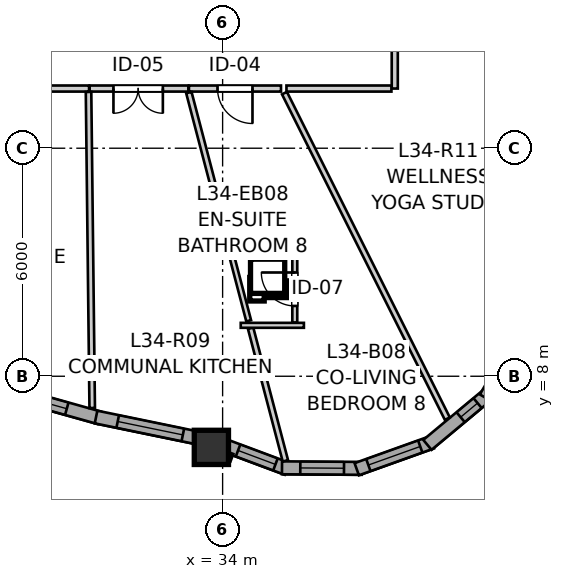
"""IFC4 building model, lengths in metres.
Left out: names, types, materials, properties, quantities, classifications, styles, units other than length and angle.
Written with IfcOpenShell. Run it as: python <this file> out.ifc"""

import sys

from ifc_helpers import new_model, si_unit, direction, frame, frame_2d, origin, origin_2d, place, context, subcontext, project, spatial, rectangle, extrude, source, transform, mapped, element, fill, save


model = new_model("IFC4")
c1 = context("Model", 3, precision=1e-05, world=origin(), true_north=direction((0.0, 1.0)))
c2 = subcontext(c1, "Body", "Model", "MODEL_VIEW")
j1 = project(units=[si_unit("LENGTHUNIT", "METRE"), si_unit("PLANEANGLEUNIT", "RADIAN")], contexts=[c1])
p1 = place(None, origin())
s1 = spatial("IfcSite", under=j1, at=p1, CompositionType="ELEMENT")
p2 = place(p1, origin())
s2 = spatial("IfcBuilding", under=s1, at=p2, CompositionType="ELEMENT")
p3 = place(p2, frame((0.0, 0.0, 115.2)))
s3 = spatial("IfcBuildingStorey", under=s2, at=p3, CompositionType="ELEMENT", Elevation=115.2)
m1 = source(origin(), c2, "Body", "SweptSolid", [
    extrude(rectangle(XDim=0.9, YDim=0.9, at=origin_2d()), origin(), (0.0, 0.0, 1.0), 2.95),
])
p4 = place(p3, frame((33.704, 6.128, 0.0), z_axis=(0.0, 0.0, 1.0), x_axis=(1.0, 0.0, 0.0)))
e1 = element("IfcColumn", 1, at=p4, inside=s3, PredefinedType="COLUMN", context=c2, shape_type="MappedRepresentation", body=[
    mapped(m1, transform((0.0, 0.0, 0.0), x_axis=(1.0, 0.0, 0.0), y_axis=(0.0, 1.0, 0.0), z_axis=(0.0, 0.0, 1.0), scale=1.0)),
])
p5 = place(p3, frame((27.819, 7.728, 0.0), z_axis=(0.0, 0.0, 1.0), x_axis=(0.963032186905, -0.269386352632, 0.0)))
e2 = element("IfcWall", 2, at=p5, inside=s3, PredefinedType="SOLIDWALL", context=c2, shape_type="SweptSolid", body=[
    extrude(rectangle(XDim=3.049, YDim=0.34, at=frame_2d((1.524, 0.0))), origin(), (0.0, 0.0, 1.0), 2.48),
])
p6 = place(p5, frame((0.71, 0.0, 0.82)))
e3 = element("IfcOpeningElement", 3, at=p6, cuts=e2, PredefinedType="OPENING", context=c2, shape_type="SweptSolid", body=[
    extrude(rectangle(XDim=1.45, YDim=1.25, at=frame_2d((0.725, 0.625))), frame((0.0, 0.18, 0.0), z_axis=(0.0, -1.0, 0.0), x_axis=(1.0, 0.0, 0.0)), (0.0, 0.0, 1.0), 0.36),
])
p7 = place(p3, frame((30.67, 6.927, 0.0), z_axis=(0.0, 0.0, 1.0), x_axis=(0.979422345081, -0.201821381317, 0.0)))
e4 = element("IfcWall", 4, at=p7, inside=s3, PredefinedType="SOLIDWALL", context=c2, shape_type="SweptSolid", body=[
    extrude(rectangle(XDim=2.903, YDim=0.34, at=frame_2d((1.452, 0.0))), origin(), (0.0, 0.0, 1.0), 2.48),
])
p8 = place(p7, frame((0.582, 0.0, 0.82)))
e5 = element("IfcOpeningElement", 5, at=p8, cuts=e4, PredefinedType="OPENING", context=c2, shape_type="SweptSolid", body=[
    extrude(rectangle(XDim=1.75, YDim=1.3, at=frame_2d((0.875, 0.65))), frame((0.0, 0.18, 0.0), z_axis=(0.0, -1.0, 0.0), x_axis=(1.0, 0.0, 0.0)), (0.0, 0.0, 1.0), 0.36),
])
p9 = place(p3, frame((33.979, 6.207, 0.0), z_axis=(0.0, 0.0, 1.0), x_axis=(0.936799566991, -0.349866504951, 0.0)))
e6 = element("IfcWall", 6, at=p9, inside=s3, PredefinedType="SOLIDWALL", context=c2, shape_type="SweptSolid", body=[
    extrude(rectangle(XDim=1.831, YDim=0.34, at=frame_2d((0.916, 0.0))), origin(), (0.0, 0.0, 1.0), 2.48),
])
p10 = place(p9, frame((0.456, 0.0, 0.82)))
e7 = element("IfcOpeningElement", 7, at=p10, cuts=e6, PredefinedType="OPENING", context=c2, shape_type="SweptSolid", body=[
    extrude(rectangle(XDim=1.05, YDim=1.45, at=frame_2d((0.525, 0.725))), frame((0.0, 0.18, 0.0), z_axis=(0.0, -1.0, 0.0), x_axis=(1.0, 0.0, 0.0)), (0.0, 0.0, 1.0), 0.36),
])
p11 = place(p3, frame((35.562, 5.591, 0.0), z_axis=(0.0, 0.0, 1.0), x_axis=(0.999976456891, -0.00686189939, 0.0)))
e8 = element("IfcWall", 8, at=p11, inside=s3, PredefinedType="SOLIDWALL", context=c2, shape_type="SweptSolid", body=[
    extrude(rectangle(XDim=2.099, YDim=0.34, at=frame_2d((1.05, 0.0))), origin(), (0.0, 0.0, 1.0), 2.48),
])
p12 = place(p11, frame((0.482, 0.0, 0.82)))
e9 = element("IfcOpeningElement", 9, at=p12, cuts=e8, PredefinedType="OPENING", context=c2, shape_type="SweptSolid", body=[
    extrude(rectangle(XDim=1.15, YDim=1.2, at=frame_2d((0.575, 0.6))), frame((0.0, 0.18, 0.0), z_axis=(0.0, -1.0, 0.0), x_axis=(1.0, 0.0, 0.0)), (0.0, 0.0, 1.0), 0.36),
])
p13 = place(p3, frame((37.529, 5.554, 0.0), z_axis=(0.0, 0.0, 1.0), x_axis=(0.941486401639, 0.33705096874, 0.0)))
e10 = element("IfcWall", 10, at=p13, inside=s3, PredefinedType="SOLIDWALL", context=c2, shape_type="SweptSolid", body=[
    extrude(rectangle(XDim=2.099, YDim=0.34, at=frame_2d((1.05, 0.0))), origin(), (0.0, 0.0, 1.0), 2.48),
])
p14 = place(p13, frame((0.324, 0.0, 0.82)))
e11 = element("IfcOpeningElement", 11, at=p14, cuts=e10, PredefinedType="OPENING", context=c2, shape_type="SweptSolid", body=[
    extrude(rectangle(XDim=1.45, YDim=1.25, at=frame_2d((0.725, 0.625))), frame((0.0, 0.18, 0.0), z_axis=(0.0, -1.0, 0.0), x_axis=(1.0, 0.0, 0.0)), (0.0, 0.0, 1.0), 0.36),
])
p15 = place(p3, frame((39.389, 6.195, 0.0), z_axis=(0.0, 0.0, 1.0), x_axis=(0.768488123124, 0.639864051669, 0.0)))
e12 = element("IfcWall", 12, at=p15, inside=s3, PredefinedType="SOLIDWALL", context=c2, shape_type="SweptSolid", body=[
    extrude(rectangle(XDim=2.099, YDim=0.34, at=frame_2d((1.05, 0.0))), origin(), (0.0, 0.0, 1.0), 2.48),
])
p16 = place(p15, frame((1.138, 0.0, 0.82)))
e13 = element("IfcOpeningElement", 13, at=p16, cuts=e12, PredefinedType="OPENING", context=c2, shape_type="SweptSolid", body=[
    extrude(rectangle(XDim=0.58, YDim=1.35, at=frame_2d((0.29, 0.675))), frame((0.0, 0.18, 0.0), z_axis=(0.0, -1.0, 0.0), x_axis=(1.0, 0.0, 0.0)), (0.0, 0.0, 1.0), 0.36),
])
p17 = place(p3, frame((40.916, 7.435, 0.0), z_axis=(0.0, 0.0, 1.0), x_axis=(0.501989603552, 0.864873654313, 0.0)))
e14 = element("IfcWall", 14, at=p17, inside=s3, PredefinedType="SOLIDWALL", context=c2, shape_type="SweptSolid", body=[
    extrude(rectangle(XDim=2.099, YDim=0.34, at=frame_2d((1.05, 0.0))), origin(), (0.0, 0.0, 1.0), 2.48),
])
p18 = place(p17, frame((0.3, 0.0, 0.82)))
e15 = element("IfcOpeningElement", 15, at=p18, cuts=e14, PredefinedType="OPENING", context=c2, shape_type="SweptSolid", body=[
    extrude(rectangle(XDim=1.5, YDim=1.45, at=frame_2d((0.75, 0.725))), frame((0.0, 0.18, 0.0), z_axis=(0.0, -1.0, 0.0), x_axis=(1.0, 0.0, 0.0)), (0.0, 0.0, 1.0), 0.36),
])
p19 = place(p3, frame((30.486, 15.57, 0.0), z_axis=(0.0, 0.0, 1.0), x_axis=(-1.0, 0.0, 0.0)))
e16 = element("IfcWall", 16, at=p19, inside=s3, PredefinedType="PARTITIONING", context=c2, shape_type="SweptSolid", body=[
    extrude(rectangle(XDim=6.725, YDim=0.16, at=frame_2d((3.363, 0.0))), origin(), (0.0, 0.0, 1.0), 2.95),
])
p20 = place(p19, frame((2.711, 0.0, 0.0)))
e17 = element("IfcOpeningElement", 17, at=p20, cuts=e16, PredefinedType="OPENING", context=c2, shape_type="SweptSolid", body=[
    extrude(rectangle(XDim=1.3, YDim=2.1, at=frame_2d((0.65, 1.05))), frame((0.0, 0.09, 0.0), z_axis=(0.0, -1.0, 0.0), x_axis=(1.0, 0.0, 0.0)), (0.0, 0.0, 1.0), 0.18),
])
p21 = place(p3, frame((38.53, 21.863, 0.0), z_axis=(0.0, 0.0, 1.0), x_axis=(0.0, -1.0, 0.0)))
e18 = element("IfcWall", 18, at=p21, inside=s3, PredefinedType="PARTITIONING", context=c2, shape_type="SweptSolid", body=[
    extrude(rectangle(XDim=6.293, YDim=0.16, at=frame_2d((3.146, 0.0))), origin(), (0.0, 0.0, 1.0), 2.95),
])
p22 = place(p21, frame((2.675, 0.0, 0.0)))
e19 = element("IfcOpeningElement", 19, at=p22, cuts=e18, PredefinedType="OPENING", context=c2, shape_type="SweptSolid", body=[
    extrude(rectangle(XDim=0.96, YDim=2.1, at=frame_2d((0.48, 1.05))), frame((0.0, 0.09, 0.0), z_axis=(0.0, -1.0, 0.0), x_axis=(1.0, 0.0, 0.0)), (0.0, 0.0, 1.0), 0.18),
])
p23 = place(p3, frame((33.099, 15.57, 0.0), z_axis=(0.0, 0.0, 1.0), x_axis=(-1.0, 0.0, 0.0)))
e20 = element("IfcWall", 20, at=p23, inside=s3, PredefinedType="PARTITIONING", context=c2, shape_type="SweptSolid", body=[
    extrude(rectangle(XDim=2.598, YDim=0.16, at=frame_2d((1.299, 0.0))), origin(), (0.0, 0.0, 1.0), 2.95),
])
p24 = place(p23, frame((0.671, 0.0, 0.0)))
e21 = element("IfcOpeningElement", 21, at=p24, cuts=e20, PredefinedType="OPENING", context=c2, shape_type="SweptSolid", body=[
    extrude(rectangle(XDim=1.3, YDim=2.1, at=frame_2d((0.65, 1.05))), frame((0.0, 0.09, 0.0), z_axis=(0.0, -1.0, 0.0), x_axis=(1.0, 0.0, 0.0)), (0.0, 0.0, 1.0), 0.18),
])
p25 = place(p3, frame((35.536, 15.57, 0.0), z_axis=(0.0, 0.0, 1.0), x_axis=(-1.0, 0.0, 0.0)))
e22 = element("IfcWall", 22, at=p25, inside=s3, PredefinedType="PARTITIONING", context=c2, shape_type="SweptSolid", body=[
    extrude(rectangle(XDim=2.422, YDim=0.16, at=frame_2d((1.211, 0.0))), origin(), (0.0, 0.0, 1.0), 2.95),
])
p26 = place(p25, frame((0.75, 0.0, 0.0)))
e23 = element("IfcOpeningElement", 23, at=p26, cuts=e22, PredefinedType="OPENING", context=c2, shape_type="SweptSolid", body=[
    extrude(rectangle(XDim=0.92, YDim=2.1, at=frame_2d((0.46, 1.05))), frame((0.0, 0.09, 0.0), z_axis=(0.0, -1.0, 0.0), x_axis=(1.0, 0.0, 0.0)), (0.0, 0.0, 1.0), 0.18),
])
p27 = place(p3, frame((35.899, 9.413, 0.0), z_axis=(0.0, 0.0, 1.0), x_axis=(0.0, 1.0, 0.0)))
e24 = element("IfcWall", 24, at=p27, inside=s3, PredefinedType="PARTITIONING", context=c2, shape_type="SweptSolid", body=[
    extrude(rectangle(XDim=1.827, YDim=0.13, at=frame_2d((0.914, 0.0))), origin(), (0.0, 0.0, 1.0), 2.95),
])
p28 = place(p27, frame((0.437, 0.0, 0.0)))
e25 = element("IfcOpeningElement", 25, at=p28, cuts=e24, PredefinedType="OPENING", context=c2, shape_type="SweptSolid", body=[
    extrude(rectangle(XDim=0.88, YDim=2.05, at=frame_2d((0.44, 1.025))), frame((0.0, 0.075, 0.0), z_axis=(0.0, -1.0, 0.0), x_axis=(1.0, 0.0, 0.0)), (0.0, 0.0, 1.0), 0.15),
])
p29 = place(p3, frame((35.628, 15.45, 0.0), z_axis=(0.0, 0.0, 1.0), x_axis=(0.447427687311, -0.894320113062, 0.0)))
e26 = element("IfcWall", 26, at=p29, inside=s3, PredefinedType="PARTITIONING", context=c2, shape_type="SweptSolid", body=[
    extrude(rectangle(XDim=9.578, YDim=0.145, at=frame_2d((4.789, 0.0))), origin(), (0.0, 0.0, 1.0), 2.95),
])
p30 = place(p3, frame((30.472, 15.481, 0.0), z_axis=(0.0, 0.0, 1.0), x_axis=(0.011623708307, -0.999932442421, 0.0)))
e27 = element("IfcWall", 27, at=p30, inside=s3, PredefinedType="PARTITIONING", context=c2, shape_type="SweptSolid", body=[
    extrude(rectangle(XDim=8.317, YDim=0.145, at=frame_2d((4.159, 0.0))), origin(), (0.0, 0.0, 1.0), 2.95),
])
p31 = place(p3, frame((33.112, 15.464, 0.0), z_axis=(0.0, 0.0, 1.0), x_axis=(0.253558008984, -0.967320182814, 0.0)))
e28 = element("IfcWall", 28, at=p31, inside=s3, PredefinedType="PARTITIONING", context=c2, shape_type="SweptSolid", body=[
    extrude(rectangle(XDim=4.382, YDim=0.145, at=frame_2d((2.191, 0.0))), origin(), (0.0, 0.0, 1.0), 2.95),
])
p32 = place(p3, frame((34.737, 9.264, 0.0), z_axis=(0.0, 0.0, 1.0), x_axis=(0.253650405993, -0.967295958608, 0.0)))
e29 = element("IfcWall", 29, at=p32, inside=s3, PredefinedType="PARTITIONING", context=c2, shape_type="SweptSolid", body=[
    extrude(rectangle(XDim=3.607, YDim=0.145, at=frame_2d((1.804, 0.0))), origin(), (0.0, 0.0, 1.0), 2.95),
])
p33 = place(p3, frame((35.68, 15.57, 0.0), z_axis=(0.0, 0.0, 1.0), x_axis=(1.0, 0.0, 0.0)))
e30 = element("IfcWall", 30, at=p33, inside=s3, PredefinedType="PARTITIONING", context=c2, shape_type="SweptSolid", body=[
    extrude(rectangle(XDim=2.762, YDim=0.16, at=frame_2d((1.381, 0.0))), origin(), (0.0, 0.0, 1.0), 2.95),
])
p34 = place(p3, frame((34.227, 11.21, 0.0), z_axis=(0.0, 0.0, 1.0), x_axis=(0.2534645297, -0.967344681168, 0.0)))
e31 = element("IfcWall", 31, at=p34, inside=s3, PredefinedType="PARTITIONING", context=c2, shape_type="SweptSolid", body=[
    extrude(rectangle(XDim=1.811, YDim=0.13, at=frame_2d((0.905, 0.0))), origin(), (0.0, 0.0, 1.0), 2.95),
])
p35 = place(p3, frame((34.319, 11.24, 0.0), z_axis=(0.0, 0.0, 1.0), x_axis=(1.0, 0.0, 0.0)))
e32 = element("IfcWall", 32, at=p35, inside=s3, PredefinedType="PARTITIONING", context=c2, shape_type="SweptSolid", body=[
    extrude(rectangle(XDim=1.507, YDim=0.13, at=frame_2d((0.753, 0.0))), origin(), (0.0, 0.0, 1.0), 2.95),
])
p36 = place(p3, frame((34.477, 9.34, 0.0), z_axis=(0.0, 0.0, 1.0), x_axis=(1.0, 0.0, 0.0)))
e33 = element("IfcWall", 33, at=p36, inside=s3, PredefinedType="PARTITIONING", context=c2, shape_type="SweptSolid", body=[
    extrude(rectangle(XDim=1.662, YDim=0.13, at=frame_2d((0.831, 0.0))), origin(), (0.0, 0.0, 1.0), 2.95),
])
m2 = source(origin(), c2, "Body", "SweptSolid", [
    extrude(rectangle(XDim=1.45, YDim=1.25, at=frame_2d((0.725, 0.625))), frame((0.0, 0.03, 0.0), z_axis=(0.0, -1.0, 0.0), x_axis=(1.0, 0.0, 0.0)), (0.0, 0.0, 1.0), 0.06),
])
p37 = place(p6, origin())
e34 = element("IfcWindow", 34, at=p37, inside=s3, PartitioningType="SINGLE_PANEL", PredefinedType="WINDOW", context=c2, shape_type="MappedRepresentation", body=[
    mapped(m2, transform((0.0, 0.0, 0.0), x_axis=(1.0, 0.0, 0.0), y_axis=(0.0, 1.0, 0.0), z_axis=(0.0, 0.0, 1.0), scale=1.0)),
])
fill(e3, e34)
m3 = source(origin(), c2, "Body", "SweptSolid", [
    extrude(rectangle(XDim=1.75, YDim=1.3, at=frame_2d((0.875, 0.65))), frame((0.0, 0.03, 0.0), z_axis=(0.0, -1.0, 0.0), x_axis=(1.0, 0.0, 0.0)), (0.0, 0.0, 1.0), 0.06),
])
p38 = place(p8, origin())
e35 = element("IfcWindow", 35, at=p38, inside=s3, PartitioningType="SINGLE_PANEL", PredefinedType="WINDOW", context=c2, shape_type="MappedRepresentation", body=[
    mapped(m3, transform((0.0, 0.0, 0.0), x_axis=(1.0, 0.0, 0.0), y_axis=(0.0, 1.0, 0.0), z_axis=(0.0, 0.0, 1.0), scale=1.0)),
])
fill(e5, e35)
m4 = source(origin(), c2, "Body", "SweptSolid", [
    extrude(rectangle(XDim=1.05, YDim=1.45, at=frame_2d((0.525, 0.725))), frame((0.0, 0.03, 0.0), z_axis=(0.0, -1.0, 0.0), x_axis=(1.0, 0.0, 0.0)), (0.0, 0.0, 1.0), 0.06),
])
p39 = place(p10, origin())
e36 = element("IfcWindow", 36, at=p39, inside=s3, PartitioningType="SINGLE_PANEL", PredefinedType="WINDOW", context=c2, shape_type="MappedRepresentation", body=[
    mapped(m4, transform((0.0, 0.0, 0.0), x_axis=(1.0, 0.0, 0.0), y_axis=(0.0, 1.0, 0.0), z_axis=(0.0, 0.0, 1.0), scale=1.0)),
])
fill(e7, e36)
m5 = source(origin(), c2, "Body", "SweptSolid", [
    extrude(rectangle(XDim=1.15, YDim=1.2, at=frame_2d((0.575, 0.6))), frame((0.0, 0.03, 0.0), z_axis=(0.0, -1.0, 0.0), x_axis=(1.0, 0.0, 0.0)), (0.0, 0.0, 1.0), 0.06),
])
p40 = place(p12, origin())
e37 = element("IfcWindow", 37, at=p40, inside=s3, PartitioningType="SINGLE_PANEL", PredefinedType="WINDOW", context=c2, shape_type="MappedRepresentation", body=[
    mapped(m5, transform((0.0, 0.0, 0.0), x_axis=(1.0, 0.0, 0.0), y_axis=(0.0, 1.0, 0.0), z_axis=(0.0, 0.0, 1.0), scale=1.0)),
])
fill(e9, e37)
p41 = place(p14, origin())
e38 = element("IfcWindow", 38, at=p41, inside=s3, PartitioningType="SINGLE_PANEL", PredefinedType="WINDOW", context=c2, shape_type="MappedRepresentation", body=[
    mapped(m2, transform((0.0, 0.0, 0.0), x_axis=(1.0, 0.0, 0.0), y_axis=(0.0, 1.0, 0.0), z_axis=(0.0, 0.0, 1.0), scale=1.0)),
])
fill(e11, e38)
m6 = source(origin(), c2, "Body", "SweptSolid", [
    extrude(rectangle(XDim=0.58, YDim=1.35, at=frame_2d((0.29, 0.675))), frame((0.0, 0.03, 0.0), z_axis=(0.0, -1.0, 0.0), x_axis=(1.0, 0.0, 0.0)), (0.0, 0.0, 1.0), 0.06),
])
p42 = place(p16, origin())
e39 = element("IfcWindow", 39, at=p42, inside=s3, PartitioningType="SINGLE_PANEL", PredefinedType="WINDOW", context=c2, shape_type="MappedRepresentation", body=[
    mapped(m6, transform((0.0, 0.0, 0.0), x_axis=(1.0, 0.0, 0.0), y_axis=(0.0, 1.0, 0.0), z_axis=(0.0, 0.0, 1.0), scale=1.0)),
])
fill(e13, e39)
m7 = source(origin(), c2, "Body", "SweptSolid", [
    extrude(rectangle(XDim=1.3, YDim=2.1, at=frame_2d((0.65, 1.05))), frame((0.0, 0.025, 0.0), z_axis=(0.0, -1.0, 0.0), x_axis=(1.0, 0.0, 0.0)), (0.0, 0.0, 1.0), 0.05),
])
p43 = place(p24, origin())
e40 = element("IfcDoor", 40, at=p43, inside=s3, OperationType="DOUBLE_DOOR_SINGLE_SWING", PredefinedType="DOOR", context=c2, shape_type="MappedRepresentation", body=[
    mapped(m7, transform((0.0, 0.0, 0.0), x_axis=(1.0, 0.0, 0.0), y_axis=(0.0, 1.0, 0.0), z_axis=(0.0, 0.0, 1.0), scale=1.0)),
])
fill(e21, e40)
m8 = source(origin(), c2, "Body", "SweptSolid", [
    extrude(rectangle(XDim=0.92, YDim=2.1, at=frame_2d((0.46, 1.05))), frame((0.0, 0.025, 0.0), z_axis=(0.0, -1.0, 0.0), x_axis=(1.0, 0.0, 0.0)), (0.0, 0.0, 1.0), 0.05),
])
p44 = place(p26, origin())
e41 = element("IfcDoor", 41, at=p44, inside=s3, OperationType="SINGLE_SWING_LEFT", PredefinedType="DOOR", context=c2, shape_type="MappedRepresentation", body=[
    mapped(m8, transform((0.0, 0.0, 0.0), x_axis=(1.0, 0.0, 0.0), y_axis=(0.0, 1.0, 0.0), z_axis=(0.0, 0.0, 1.0), scale=1.0)),
])
fill(e23, e41)
m9 = source(origin(), c2, "Body", "SweptSolid", [
    extrude(rectangle(XDim=0.88, YDim=2.05, at=frame_2d((0.44, 1.025))), frame((0.0, 0.025, 0.0), z_axis=(0.0, -1.0, 0.0), x_axis=(1.0, 0.0, 0.0)), (0.0, 0.0, 1.0), 0.05),
])
p45 = place(p28, origin())
e42 = element("IfcDoor", 42, at=p45, inside=s3, OperationType="SINGLE_SWING_RIGHT", PredefinedType="DOOR", context=c2, shape_type="MappedRepresentation", body=[
    mapped(m9, transform((0.0, 0.0, 0.0), x_axis=(1.0, 0.0, 0.0), y_axis=(0.0, 1.0, 0.0), z_axis=(0.0, 0.0, 1.0), scale=1.0)),
])
fill(e25, e42)
save(model, sys.argv[1])
